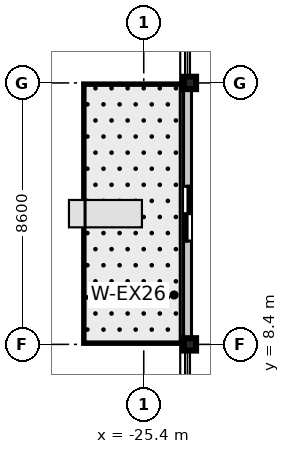
"""IFC4 building model, lengths in metres.
Left out: names, types, materials, properties, quantities, classifications, styles, units other than length and angle.
Written with IfcOpenShell. Run it as: python <this file> out.ifc"""

import sys

from ifc_helpers import new_model, si_unit, direction, frame, frame_2d, origin, origin_2d, place, context, subcontext, project, spatial, rectangle, i_section, extrude, source, transform, mapped, element, fill, save


model = new_model("IFC4")
c1 = context("Model", 3, precision=1e-05, world=origin(), true_north=direction((0.0, 1.0)))
c2 = subcontext(c1, "Body", "Model", "MODEL_VIEW")
j1 = project(units=[si_unit("LENGTHUNIT", "METRE"), si_unit("PLANEANGLEUNIT", "RADIAN")], contexts=[c1])
p1 = place(None, origin())
s1 = spatial("IfcSite", under=j1, at=p1, CompositionType="ELEMENT")
p2 = place(p1, origin())
s2 = spatial("IfcBuilding", under=s1, at=p2, CompositionType="ELEMENT")
p3 = place(p2, frame((0.0, 0.0, 227.1)))
s3 = spatial("IfcBuildingStorey", under=s2, at=p3, CompositionType="ELEMENT", Elevation=227.1)
m1 = source(origin(), c2, "Body", "SweptSolid", [
    extrude(i_section(OverallWidth=0.401, OverallDepth=0.406, WebThickness=0.016, FlangeThickness=0.025, at=origin_2d()), origin(), (0.0, 0.0, 1.0), 3.655),
])
for number, where, z_axis, x_axis in (
    (1, (-23.88, 8.4, 0.0), (0.0, 0.0, 1.0), (1.0, 0.0, 0.0)),
    (2, (-23.88, 17.0, 0.0), (0.0, 0.0, 1.0), (1.0, 0.0, 0.0)),
):
    element("IfcColumn", number, at=place(p3, frame(where, z_axis=z_axis, x_axis=x_axis)), inside=s3, PredefinedType="COLUMN", context=c2, shape_type="MappedRepresentation", body=[
        mapped(m1, transform((0.0, 0.0, 0.0), scale=1.0)),
    ])
m2 = source(origin(), c2, "Body", "SweptSolid", [
    extrude(rectangle(XDim=8.6, YDim=0.26, at=frame_2d((4.3, 0.0))), origin(), (0.0, 0.0, 1.0), 2.89),
])
p4 = place(p3, frame((-23.96, 8.4, 0.0), z_axis=(0.0, 0.0, 1.0), x_axis=(0.0, 1.0, 0.0)))
e3 = element("IfcWall", 3, at=p4, inside=s3, PredefinedType="STANDARD", context=c2, shape_type="MappedRepresentation", body=[
    mapped(m2, transform((0.0, 0.0, 0.0), scale=1.0)),
])
p5 = place(p4, frame((3.4, 0.0, 0.0)))
e4 = element("IfcOpeningElement", 4, at=p5, cuts=e3, PredefinedType="OPENING", context=c2, shape_type="SweptSolid", body=[
    extrude(rectangle(XDim=1.8, YDim=2.25, at=frame_2d((0.9, 1.125))), frame((0.0, 0.14, 0.0), z_axis=(0.0, -1.0, 0.0), x_axis=(1.0, 0.0, 0.0)), (0.0, 0.0, 1.0), 0.28),
])
m3 = source(origin(), c2, "Body", "SweptSolid", [
    extrude(rectangle(XDim=1.8, YDim=2.25, at=frame_2d((0.9, 1.125))), frame((0.0, 0.025, 0.0), z_axis=(0.0, -1.0, 0.0), x_axis=(1.0, 0.0, 0.0)), (0.0, 0.0, 1.0), 0.05),
])
p6 = place(p5, origin())
e5 = element("IfcDoor", 5, at=p6, inside=s3, OperationType="DOUBLE_DOOR_SLIDING", PredefinedType="DOOR", context=c2, shape_type="MappedRepresentation", body=[
    mapped(m3, transform((0.0, 0.0, 0.0), scale=1.0)),
])
fill(e4, e5)
save(model, sys.argv[1])
